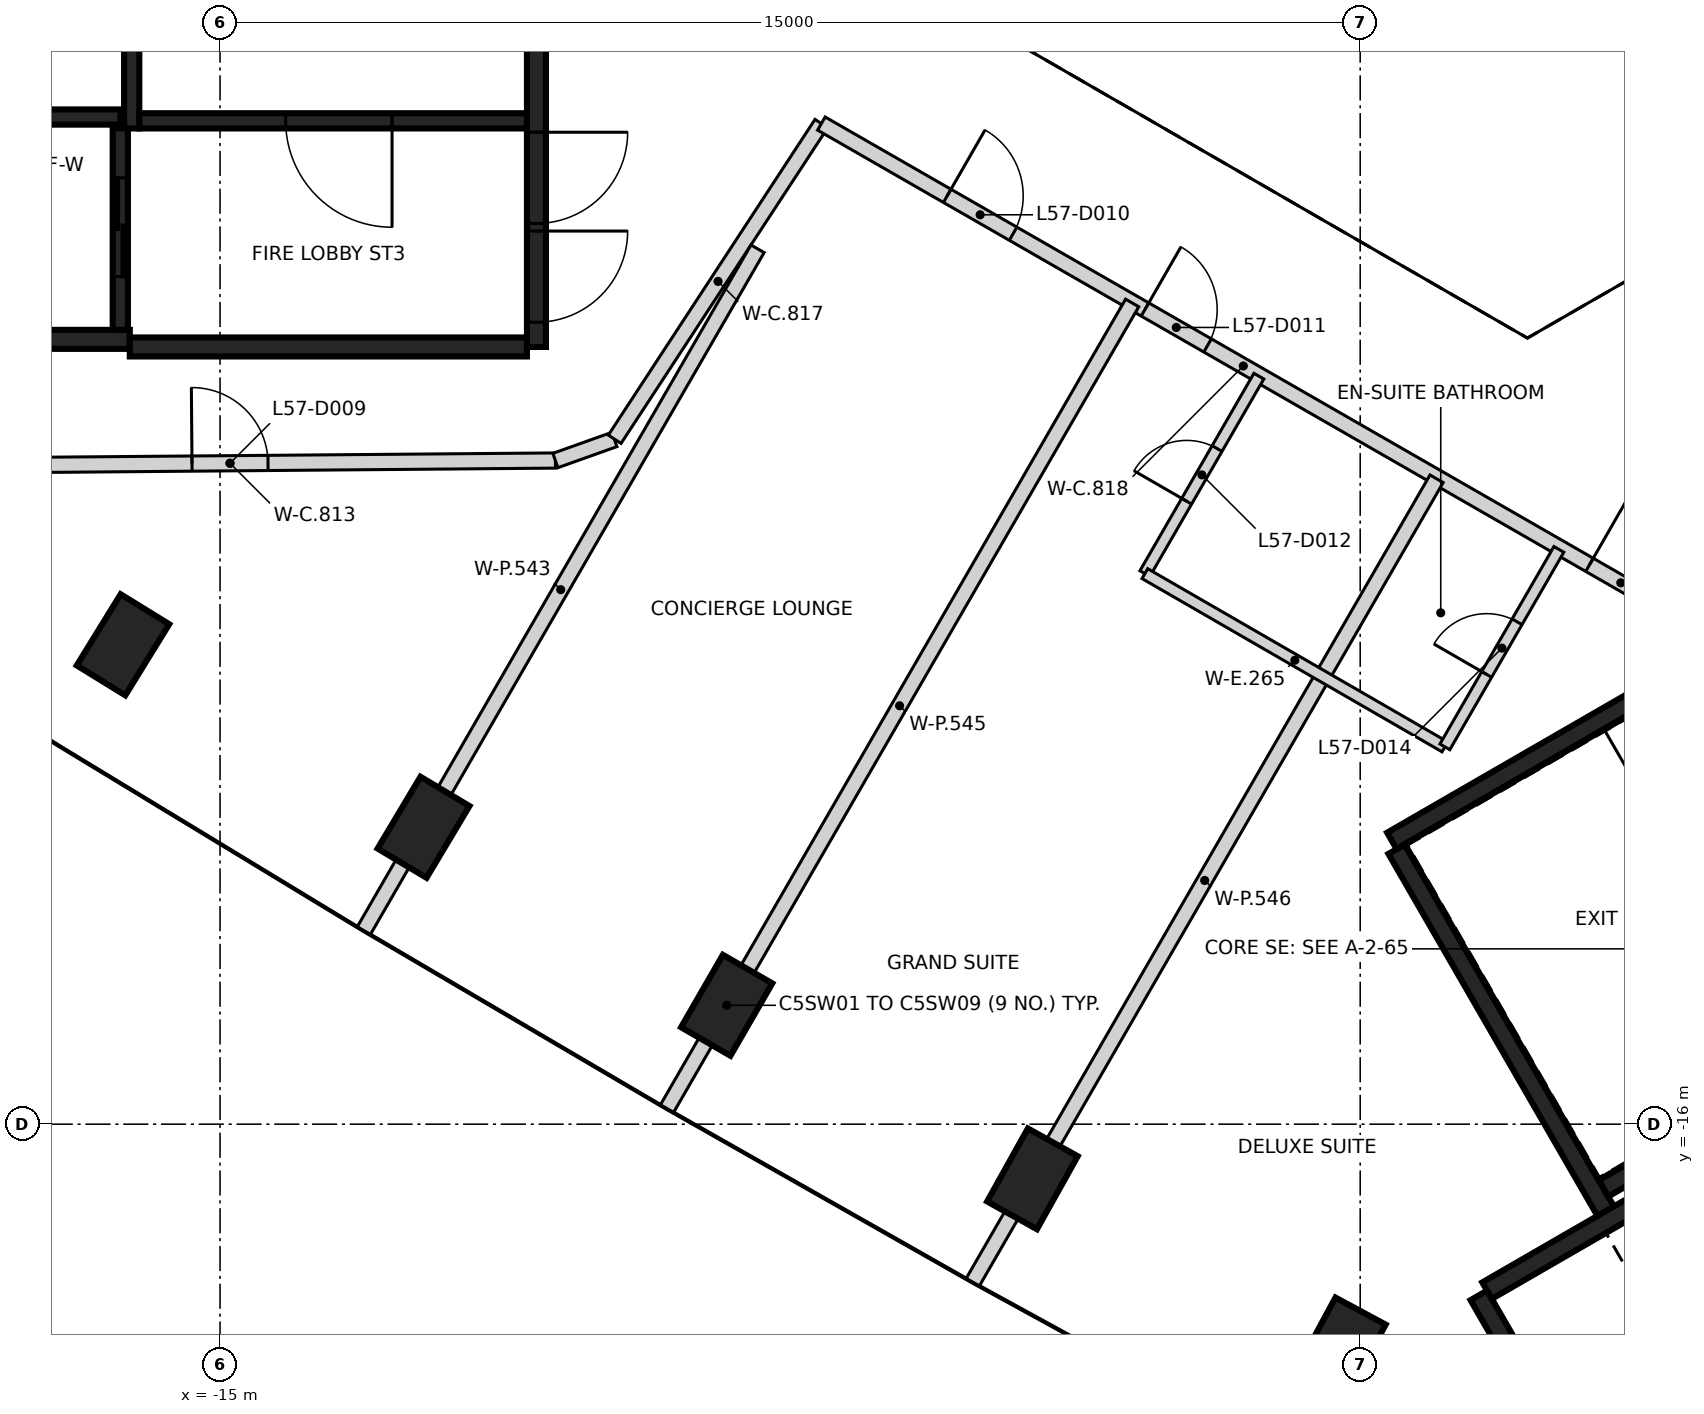
"""IFC4 building model, lengths in metres.
Left out: names, types, materials, properties, quantities, classifications, styles, units other than length and angle.
Written with IfcOpenShell. Run it as: python <this file> out.ifc"""

import sys

from ifc_helpers import new_model, si_unit, direction, frame, frame_2d, origin, origin_2d, place, context, subcontext, project, spatial, rectangle, extrude, element, fill, save


model = new_model("IFC4")
c1 = context("Model", 3, precision=1e-05, world=origin(), true_north=direction((0.0, 1.0)))
c2 = subcontext(c1, "Body", "Model", "MODEL_VIEW")
j1 = project(units=[si_unit("LENGTHUNIT", "METRE"), si_unit("PLANEANGLEUNIT", "RADIAN")], contexts=[c1])
p1 = place(None, origin())
s1 = spatial("IfcSite", under=j1, at=p1, CompositionType="ELEMENT")
p2 = place(p1, origin())
s2 = spatial("IfcBuilding", under=s1, at=p2, CompositionType="ELEMENT")
p3 = place(p2, frame((0.0, 0.0, 228.6)))
s3 = spatial("IfcBuildingStorey", under=s2, at=p3, CompositionType="ELEMENT", Elevation=228.6)
for number, where, z_axis, x_axis in (
    (1, (-16.277, -9.693, -0.35), (0.0, 0.0, 1.0), (0.525, 0.851, 0.0)),
    (2, (-12.323, -12.094, -0.35), (0.0, 0.0, 1.0), (0.513, 0.858, 0.0)),
    (3, (-8.335, -14.436, -0.35), (0.0, 0.0, 1.0), (0.5, 0.866, 0.0)),
    (4, (-4.312, -16.719, -0.35), (0.0, 0.0, 1.0), (0.487, 0.873, 0.0)),
    (5, (-0.256, -18.943, -0.35), (0.0, 0.0, 1.0), (0.475, 0.88, 0.0)),
):
    element("IfcColumn", number, at=place(p3, frame(where, z_axis=z_axis, x_axis=x_axis)), inside=s3, PredefinedType="COLUMN", context=c2, shape_type="SweptSolid", body=[
        extrude(rectangle(XDim=1.1, YDim=0.75, at=origin_2d()), origin(), (0.0, 0.0, 1.0), 3.6),
    ])
p4 = place(p3, frame((-10.837, 5.775, 0.0), z_axis=(0.0, 0.0, 1.0), x_axis=(0.0, -1.0, 0.0)))
e6 = element("IfcWall", 6, at=p4, inside=s3, PredefinedType="SHEAR", context=c2, shape_type="SweptSolid", body=[
    extrude(rectangle(XDim=11.55, YDim=0.25, at=frame_2d((5.775, 0.0))), origin(), (0.0, 0.0, 1.0), 3.25),
])
p5 = place(p4, frame((10.025, 0.0, 0.0)))
e7 = element("IfcOpeningElement", 7, at=p5, cuts=e6, PredefinedType="OPENING", context=c2, shape_type="SweptSolid", body=[
    extrude(rectangle(XDim=1.2, YDim=2.1, at=frame_2d((0.6, 1.05))), frame((0.0, 0.135, 0.0), z_axis=(0.0, -1.0, 0.0), x_axis=(1.0, 0.0, 0.0)), (0.0, 0.0, 1.0), 0.27),
])
p6 = place(p4, frame((8.725, 0.0, 0.0)))
e8 = element("IfcOpeningElement", 8, at=p6, cuts=e6, PredefinedType="OPENING", context=c2, shape_type="SweptSolid", body=[
    extrude(rectangle(XDim=1.2, YDim=2.1, at=frame_2d((0.6, 1.05))), frame((0.0, 0.135, 0.0), z_axis=(0.0, -1.0, 0.0), x_axis=(1.0, 0.0, 0.0)), (0.0, 0.0, 1.0), 0.27),
])
p7 = place(p3, frame((-16.187, -5.675, 0.0), z_axis=(0.0, 0.0, 1.0), x_axis=(-1.0, 0.0, 0.0)))
e9 = element("IfcWall", 9, at=p7, inside=s3, PredefinedType="SHEAR", context=c2, shape_type="SweptSolid", body=[
    extrude(rectangle(XDim=6.125, YDim=0.25, at=frame_2d((3.062, 0.0))), origin(), (0.0, 0.0, 1.0), 3.25),
])
p8 = place(p7, frame((3.563, 0.0, 0.0)))
e10 = element("IfcOpeningElement", 10, at=p8, cuts=e9, PredefinedType="OPENING", context=c2, shape_type="SweptSolid", body=[
    extrude(rectangle(XDim=1.0, YDim=2.1, at=frame_2d((0.5, 1.05))), frame((0.0, 0.135, 0.0), z_axis=(0.0, -1.0, 0.0), x_axis=(1.0, 0.0, 0.0)), (0.0, 0.0, 1.0), 0.27),
])
p9 = place(p3, frame((-10.963, -5.775, 0.0), z_axis=(0.0, 0.0, 1.0), x_axis=(-1.0, 0.0, 0.0)))
e11 = element("IfcWall", 11, at=p9, inside=s3, PredefinedType="SHEAR", context=c2, shape_type="SweptSolid", body=[
    extrude(rectangle(XDim=5.225, YDim=0.25, at=frame_2d((2.612, 0.0))), origin(), (0.0, 0.0, 1.0), 3.25),
])
p10 = place(p3, frame((-16.162, 3.074, 0.0), z_axis=(0.0, 0.0, 1.0), x_axis=(0.0, -1.0, 0.0)))
e12 = element("IfcWall", 12, at=p10, inside=s3, PredefinedType="SHEAR", context=c2, shape_type="SweptSolid", body=[
    extrude(rectangle(XDim=5.974, YDim=0.2, at=frame_2d((2.987, 0.0))), origin(), (0.0, 0.0, 1.0), 3.25),
])
p11 = place(p3, frame((-10.963, -2.8, 0.0), z_axis=(0.0, 0.0, 1.0), x_axis=(-1.0, 0.0, 0.0)))
e13 = element("IfcWall", 13, at=p11, inside=s3, PredefinedType="SHEAR", context=c2, shape_type="SweptSolid", body=[
    extrude(rectangle(XDim=5.098, YDim=0.2, at=frame_2d((2.549, 0.0))), origin(), (0.0, 0.0, 1.0), 3.25),
])
p12 = place(p11, frame((1.774, 0.0, 0.0)))
e14 = element("IfcOpeningElement", 14, at=p12, cuts=e13, PredefinedType="OPENING", context=c2, shape_type="SweptSolid", body=[
    extrude(rectangle(XDim=1.4, YDim=2.1, at=frame_2d((0.7, 1.05))), frame((0.0, 0.11, 0.0), z_axis=(0.0, -1.0, 0.0), x_axis=(1.0, 0.0, 0.0)), (0.0, 0.0, 1.0), 0.22),
])
p13 = place(p3, frame((-19.412, -2.75, 0.0), z_axis=(0.0, 0.0, 1.0), x_axis=(1.0, 0.0, 0.0)))
e15 = element("IfcWall", 15, at=p13, inside=s3, PredefinedType="SHEAR", context=c2, shape_type="SweptSolid", body=[
    extrude(rectangle(XDim=3.1, YDim=0.2, at=frame_2d((1.55, 0.0))), origin(), (0.0, 0.0, 1.0), 3.25),
])
p14 = place(p3, frame((-16.312, -2.898, 0.0), z_axis=(0.0, 0.0, 1.0), x_axis=(0.0, -1.0, 0.0)))
e16 = element("IfcWall", 16, at=p14, inside=s3, PredefinedType="SHEAR", context=c2, shape_type="SweptSolid", body=[
    extrude(rectangle(XDim=2.651, YDim=0.2, at=frame_2d((1.325, 0.0))), origin(), (0.0, 0.0, 1.0), 3.25),
])
p15 = place(p14, frame((0.652, 0.0, 0.0)))
e17 = element("IfcOpeningElement", 17, at=p15, cuts=e16, PredefinedType="OPENING", context=c2, shape_type="SweptSolid", body=[
    extrude(rectangle(XDim=1.3, YDim=2.1, at=frame_2d((0.65, 1.05))), frame((0.0, 0.11, 0.0), z_axis=(0.0, -1.0, 0.0), x_axis=(1.0, 0.0, 0.0)), (0.0, 0.0, 1.0), 0.22),
])
p16 = place(p3, frame((0.417, -12.273, 0.0), z_axis=(0.0, 0.0, 1.0), x_axis=(0.866021906294, 0.500006057782, 0.0)))
e18 = element("IfcWall", 18, at=p16, inside=s3, PredefinedType="SHEAR", context=c2, shape_type="SweptSolid", body=[
    extrude(rectangle(XDim=11.55, YDim=0.25, at=frame_2d((5.775, 0.0))), origin(), (0.0, 0.0, 1.0), 3.25),
])
p17 = place(p16, frame((10.025, 0.0, 0.0)))
e19 = element("IfcOpeningElement", 19, at=p17, cuts=e18, PredefinedType="OPENING", context=c2, shape_type="SweptSolid", body=[
    extrude(rectangle(XDim=1.2, YDim=2.1, at=frame_2d((0.6, 1.05))), frame((0.0, 0.135, 0.0), z_axis=(0.0, -1.0, 0.0), x_axis=(1.0, 0.0, 0.0)), (0.0, 0.0, 1.0), 0.27),
])
p18 = place(p16, frame((8.725, 0.0, 0.0)))
e20 = element("IfcOpeningElement", 20, at=p18, cuts=e18, PredefinedType="OPENING", context=c2, shape_type="SweptSolid", body=[
    extrude(rectangle(XDim=1.2, YDim=2.1, at=frame_2d((0.6, 1.05))), frame((0.0, 0.135, 0.0), z_axis=(0.0, -1.0, 0.0), x_axis=(1.0, 0.0, 0.0)), (0.0, 0.0, 1.0), 0.27),
])
p19 = place(p3, frame((3.235, -17.153, 0.0), z_axis=(0.0, 0.0, 1.0), x_axis=(-0.500008851346, 0.866020293397, 0.0)))
e21 = element("IfcWall", 21, at=p19, inside=s3, PredefinedType="SHEAR", context=c2, shape_type="SweptSolid", body=[
    extrude(rectangle(XDim=5.51, YDim=0.25, at=frame_2d((2.755, 0.0))), origin(), (0.0, 0.0, 1.0), 3.25),
])
p20 = place(p3, frame((3.217, -21.122, 0.0), z_axis=(0.0, 0.0, 1.0), x_axis=(-0.499998874531, 0.866026053573, 0.0)))
e22 = element("IfcWall", 22, at=p20, inside=s3, PredefinedType="SHEAR", context=c2, shape_type="SweptSolid", body=[
    extrude(rectangle(XDim=3.313, YDim=0.25, at=frame_2d((1.656, 0.0))), origin(), (0.0, 0.0, 1.0), 3.25),
])
p21 = place(p3, frame((1.669, -18.19, 0.0), z_axis=(0.0, 0.0, 1.0), x_axis=(0.866042235819, 0.499970844928, 0.0)))
e23 = element("IfcWall", 23, at=p21, inside=s3, PredefinedType="SHEAR", context=c2, shape_type="SweptSolid", body=[
    extrude(rectangle(XDim=2.865, YDim=0.25, at=frame_2d((1.432, 0.0))), origin(), (0.0, 0.0, 1.0), 3.25),
])
p22 = place(p3, frame((5.431, -15.556, 0.0), z_axis=(0.0, 0.0, 1.0), x_axis=(-0.866022940537, -0.500004266446, 0.0)))
e24 = element("IfcWall", 24, at=p22, inside=s3, PredefinedType="SHEAR", context=c2, shape_type="SweptSolid", body=[
    extrude(rectangle(XDim=2.575, YDim=0.25, at=frame_2d((1.287, 0.0))), origin(), (0.0, 0.0, 1.0), 3.25),
])
p23 = place(p3, frame((-19.15, -7.341, 0.0), z_axis=(0.0, 0.0, 1.0), x_axis=(0.999964623126, 0.008411450351, 0.0)))
e25 = element("IfcWall", 25, at=p23, inside=s3, PredefinedType="PARTITIONING", context=c2, shape_type="SweptSolid", body=[
    extrude(rectangle(XDim=8.562, YDim=0.2, at=frame_2d((4.281, 0.0))), origin(), (0.0, 0.0, 1.0), 3.25),
])
p24 = place(p23, frame((3.781, 0.0, 0.0)))
e26 = element("IfcOpeningElement", 26, at=p24, cuts=e25, PredefinedType="OPENING", context=c2, shape_type="SweptSolid", body=[
    extrude(rectangle(XDim=1.0, YDim=2.1, at=frame_2d((0.5, 1.05))), frame((0.0, 0.11, 0.0), z_axis=(0.0, -1.0, 0.0), x_axis=(1.0, 0.0, 0.0)), (0.0, 0.0, 1.0), 0.22),
])
p25 = place(p3, frame((-10.588, -7.269, 0.0), z_axis=(0.0, 0.0, 1.0), x_axis=(0.941741911595, 0.336336396998, 0.0)))
e27 = element("IfcWall", 27, at=p25, inside=s3, PredefinedType="PARTITIONING", context=c2, shape_type="SweptSolid", body=[
    extrude(rectangle(XDim=0.824, YDim=0.2, at=frame_2d((0.412, 0.0))), origin(), (0.0, 0.0, 1.0), 3.25),
])
p26 = place(p3, frame((-9.808, -6.989, 0.0), z_axis=(0.0, 0.0, 1.0), x_axis=(0.547746188785, 0.836644555753, 0.0)))
e28 = element("IfcWall", 28, at=p26, inside=s3, PredefinedType="PARTITIONING", context=c2, shape_type="SweptSolid", body=[
    extrude(rectangle(XDim=4.964, YDim=0.2, at=frame_2d((2.482, 0.0))), origin(), (0.0, 0.0, 1.0), 3.25),
])
p27 = place(p3, frame((-7.089, -2.836, 0.0), z_axis=(0.0, 0.0, 1.0), x_axis=(0.867106243364, -0.498123240493, 0.0)))
e29 = element("IfcWall", 29, at=p27, inside=s3, PredefinedType="PARTITIONING", context=c2, shape_type="SweptSolid", body=[
    extrude(rectangle(XDim=12.804, YDim=0.2, at=frame_2d((6.402, 0.0))), origin(), (0.0, 0.0, 1.0), 3.25),
])
p28 = place(p27, frame((1.909, 0.0, 0.0)))
e30 = element("IfcOpeningElement", 30, at=p28, cuts=e29, PredefinedType="OPENING", context=c2, shape_type="SweptSolid", body=[
    extrude(rectangle(XDim=1.0, YDim=2.1, at=frame_2d((0.5, 1.05))), frame((0.0, 0.11, 0.0), z_axis=(0.0, -1.0, 0.0), x_axis=(1.0, 0.0, 0.0)), (0.0, 0.0, 1.0), 0.22),
])
p29 = place(p27, frame((4.91, 0.0, 0.0)))
e31 = element("IfcOpeningElement", 31, at=p29, cuts=e29, PredefinedType="OPENING", context=c2, shape_type="SweptSolid", body=[
    extrude(rectangle(XDim=0.95, YDim=2.1, at=frame_2d((0.475, 1.05))), frame((0.0, 0.11, 0.0), z_axis=(0.0, -1.0, 0.0), x_axis=(1.0, 0.0, 0.0)), (0.0, 0.0, 1.0), 0.22),
])
p30 = place(p27, frame((11.654, 0.0, 0.0)))
e32 = element("IfcOpeningElement", 32, at=p30, cuts=e29, PredefinedType="OPENING", context=c2, shape_type="SweptSolid", body=[
    extrude(rectangle(XDim=0.95, YDim=2.1, at=frame_2d((0.475, 1.05))), frame((0.0, 0.11, 0.0), z_axis=(0.0, -1.0, 0.0), x_axis=(1.0, 0.0, 0.0)), (0.0, 0.0, 1.0), 0.22),
])
p31 = place(p3, frame((-13.107, -13.453, 0.0), z_axis=(0.0, 0.0, 1.0), x_axis=(0.500020349827, 0.866013654488, 0.0)))
e33 = element("IfcWall", 33, at=p31, inside=s3, PredefinedType="PARTITIONING", context=c2, shape_type="SweptSolid", body=[
    extrude(rectangle(XDim=10.357, YDim=0.2, at=frame_2d((5.179, 0.0))), origin(), (0.0, 0.0, 1.0), 3.25),
])
p32 = place(p3, frame((-9.119, -15.795, 0.0), z_axis=(0.0, 0.0, 1.0), x_axis=(0.50001601051, 0.866016159915, 0.0)))
e34 = element("IfcWall", 34, at=p32, inside=s3, PredefinedType="PARTITIONING", context=c2, shape_type="SweptSolid", body=[
    extrude(rectangle(XDim=12.238, YDim=0.2, at=frame_2d((6.119, 0.0))), origin(), (0.0, 0.0, 1.0), 3.25),
])
p33 = place(p3, frame((-5.097, -18.078, 0.0), z_axis=(0.0, 0.0, 1.0), x_axis=(0.499960272111, 0.866048339477, 0.0)))
e35 = element("IfcWall", 35, at=p33, inside=s3, PredefinedType="PARTITIONING", context=c2, shape_type="SweptSolid", body=[
    extrude(rectangle(XDim=12.204, YDim=0.2, at=frame_2d((6.102, 0.0))), origin(), (0.0, 0.0, 1.0), 3.25),
])
p34 = place(p3, frame((-2.833, -8.757, 0.0), z_axis=(0.0, 0.0, 1.0), x_axis=(0.499990139034, 0.866031096941, 0.0)))
e36 = element("IfcWall", 36, at=p34, inside=s3, PredefinedType="PARTITIONING", context=c2, shape_type="SweptSolid", body=[
    extrude(rectangle(XDim=3.0, YDim=0.15, at=frame_2d((1.5, 0.0))), origin(), (0.0, 0.0, 1.0), 3.25),
])
p35 = place(p34, frame((1.1, 0.0, 0.0)))
e37 = element("IfcOpeningElement", 37, at=p35, cuts=e36, PredefinedType="OPENING", context=c2, shape_type="SweptSolid", body=[
    extrude(rectangle(XDim=0.8, YDim=2.1, at=frame_2d((0.4, 1.05))), frame((0.0, 0.085, 0.0), z_axis=(0.0, -1.0, 0.0), x_axis=(1.0, 0.0, 0.0)), (0.0, 0.0, 1.0), 0.17),
])
p36 = place(p3, frame((-2.833, -8.757, 0.0), z_axis=(0.0, 0.0, 1.0), x_axis=(0.866002713795, -0.500039298155, 0.0)))
e38 = element("IfcWall", 38, at=p36, inside=s3, PredefinedType="PARTITIONING", context=c2, shape_type="SweptSolid", body=[
    extrude(rectangle(XDim=4.558, YDim=0.15, at=frame_2d((2.279, 0.0))), origin(), (0.0, 0.0, 1.0), 3.25),
])
p37 = place(p3, frame((1.114, -11.036, 0.0), z_axis=(0.0, 0.0, 1.0), x_axis=(0.50002537861, 0.866010750942, 0.0)))
e39 = element("IfcWall", 39, at=p37, inside=s3, PredefinedType="PARTITIONING", context=c2, shape_type="SweptSolid", body=[
    extrude(rectangle(XDim=3.0, YDim=0.15, at=frame_2d((1.5, 0.0))), origin(), (0.0, 0.0, 1.0), 3.25),
])
p38 = place(p37, frame((1.1, 0.0, 0.0)))
e40 = element("IfcOpeningElement", 40, at=p38, cuts=e39, PredefinedType="OPENING", context=c2, shape_type="SweptSolid", body=[
    extrude(rectangle(XDim=0.8, YDim=2.1, at=frame_2d((0.4, 1.05))), frame((0.0, 0.085, 0.0), z_axis=(0.0, -1.0, 0.0), x_axis=(1.0, 0.0, 0.0)), (0.0, 0.0, 1.0), 0.17),
])
p39 = place(p15, origin())
e41 = element("IfcDoor", 41, at=p39, inside=s3, OperationType="SLIDING_TO_LEFT", PredefinedType="DOOR", context=c2, shape_type="SweptSolid", body=[
    extrude(rectangle(XDim=1.3, YDim=2.1, at=frame_2d((0.65, 1.05))), frame((0.0, 0.025, 0.0), z_axis=(0.0, -1.0, 0.0), x_axis=(1.0, 0.0, 0.0)), (0.0, 0.0, 1.0), 0.05),
])
fill(e17, e41)
p40 = place(p5, origin())
e42 = element("IfcDoor", 42, at=p40, inside=s3, OperationType="SINGLE_SWING_LEFT", PredefinedType="DOOR", context=c2, shape_type="SweptSolid", body=[
    extrude(rectangle(XDim=1.2, YDim=2.1, at=frame_2d((0.6, 1.05))), frame((0.0, 0.025, 0.0), z_axis=(0.0, -1.0, 0.0), x_axis=(1.0, 0.0, 0.0)), (0.0, 0.0, 1.0), 0.05),
])
fill(e7, e42)
p41 = place(p6, origin())
e43 = element("IfcDoor", 43, at=p41, inside=s3, OperationType="SINGLE_SWING_RIGHT", PredefinedType="DOOR", context=c2, shape_type="SweptSolid", body=[
    extrude(rectangle(XDim=1.2, YDim=2.1, at=frame_2d((0.6, 1.05))), frame((0.0, 0.025, 0.0), z_axis=(0.0, -1.0, 0.0), x_axis=(1.0, 0.0, 0.0)), (0.0, 0.0, 1.0), 0.05),
])
fill(e8, e43)
p42 = place(p12, origin())
e44 = element("IfcDoor", 44, at=p42, inside=s3, OperationType="SINGLE_SWING_LEFT", PredefinedType="DOOR", context=c2, shape_type="SweptSolid", body=[
    extrude(rectangle(XDim=1.4, YDim=2.1, at=frame_2d((0.7, 1.05))), frame((0.0, 0.025, 0.0), z_axis=(0.0, -1.0, 0.0), x_axis=(1.0, 0.0, 0.0)), (0.0, 0.0, 1.0), 0.05),
])
fill(e14, e44)
p43 = place(p24, origin())
e45 = element("IfcDoor", 45, at=p43, inside=s3, OperationType="SINGLE_SWING_LEFT", PredefinedType="DOOR", context=c2, shape_type="SweptSolid", body=[
    extrude(rectangle(XDim=1.0, YDim=2.1, at=frame_2d((0.5, 1.05))), frame((0.0, 0.025, 0.0), z_axis=(0.0, -1.0, 0.0), x_axis=(1.0, 0.0, 0.0)), (0.0, 0.0, 1.0), 0.05),
])
fill(e26, e45)
p44 = place(p28, frame((1.0, 0.0, 0.0), z_axis=(0.0, 0.0, 1.0), x_axis=(-1.0, 0.0, 0.0)))
e46 = element("IfcDoor", 46, at=p44, inside=s3, OperationType="SINGLE_SWING_LEFT", PredefinedType="DOOR", context=c2, shape_type="SweptSolid", body=[
    extrude(rectangle(XDim=1.0, YDim=2.1, at=frame_2d((0.5, 1.05))), frame((0.0, 0.025, 0.0), z_axis=(0.0, -1.0, 0.0), x_axis=(1.0, 0.0, 0.0)), (0.0, 0.0, 1.0), 0.05),
])
fill(e30, e46)
p45 = place(p29, frame((0.95, 0.0, 0.0), z_axis=(0.0, 0.0, 1.0), x_axis=(-1.0, 0.0, 0.0)))
e47 = element("IfcDoor", 47, at=p45, inside=s3, OperationType="SINGLE_SWING_LEFT", PredefinedType="DOOR", context=c2, shape_type="SweptSolid", body=[
    extrude(rectangle(XDim=0.95, YDim=2.1, at=frame_2d((0.475, 1.05))), frame((0.0, 0.025, 0.0), z_axis=(0.0, -1.0, 0.0), x_axis=(1.0, 0.0, 0.0)), (0.0, 0.0, 1.0), 0.05),
])
fill(e31, e47)
p46 = place(p35, frame((0.8, 0.0, 0.0), z_axis=(0.0, 0.0, 1.0), x_axis=(-1.0, 0.0, 0.0)))
e48 = element("IfcDoor", 48, at=p46, inside=s3, OperationType="SINGLE_SWING_LEFT", PredefinedType="DOOR", context=c2, shape_type="SweptSolid", body=[
    extrude(rectangle(XDim=0.8, YDim=2.1, at=frame_2d((0.4, 1.05))), frame((0.0, 0.025, 0.0), z_axis=(0.0, -1.0, 0.0), x_axis=(1.0, 0.0, 0.0)), (0.0, 0.0, 1.0), 0.05),
])
fill(e37, e48)
p47 = place(p30, frame((0.95, 0.0, 0.0), z_axis=(0.0, 0.0, 1.0), x_axis=(-1.0, 0.0, 0.0)))
e49 = element("IfcDoor", 49, at=p47, inside=s3, OperationType="SINGLE_SWING_LEFT", PredefinedType="DOOR", context=c2, shape_type="SweptSolid", body=[
    extrude(rectangle(XDim=0.95, YDim=2.1, at=frame_2d((0.475, 1.05))), frame((0.0, 0.025, 0.0), z_axis=(0.0, -1.0, 0.0), x_axis=(1.0, 0.0, 0.0)), (0.0, 0.0, 1.0), 0.05),
])
fill(e32, e49)
p48 = place(p38, origin())
e50 = element("IfcDoor", 50, at=p48, inside=s3, OperationType="SINGLE_SWING_LEFT", PredefinedType="DOOR", context=c2, shape_type="SweptSolid", body=[
    extrude(rectangle(XDim=0.8, YDim=2.1, at=frame_2d((0.4, 1.05))), frame((0.0, 0.025, 0.0), z_axis=(0.0, -1.0, 0.0), x_axis=(1.0, 0.0, 0.0)), (0.0, 0.0, 1.0), 0.05),
])
fill(e40, e50)
save(model, sys.argv[1])
